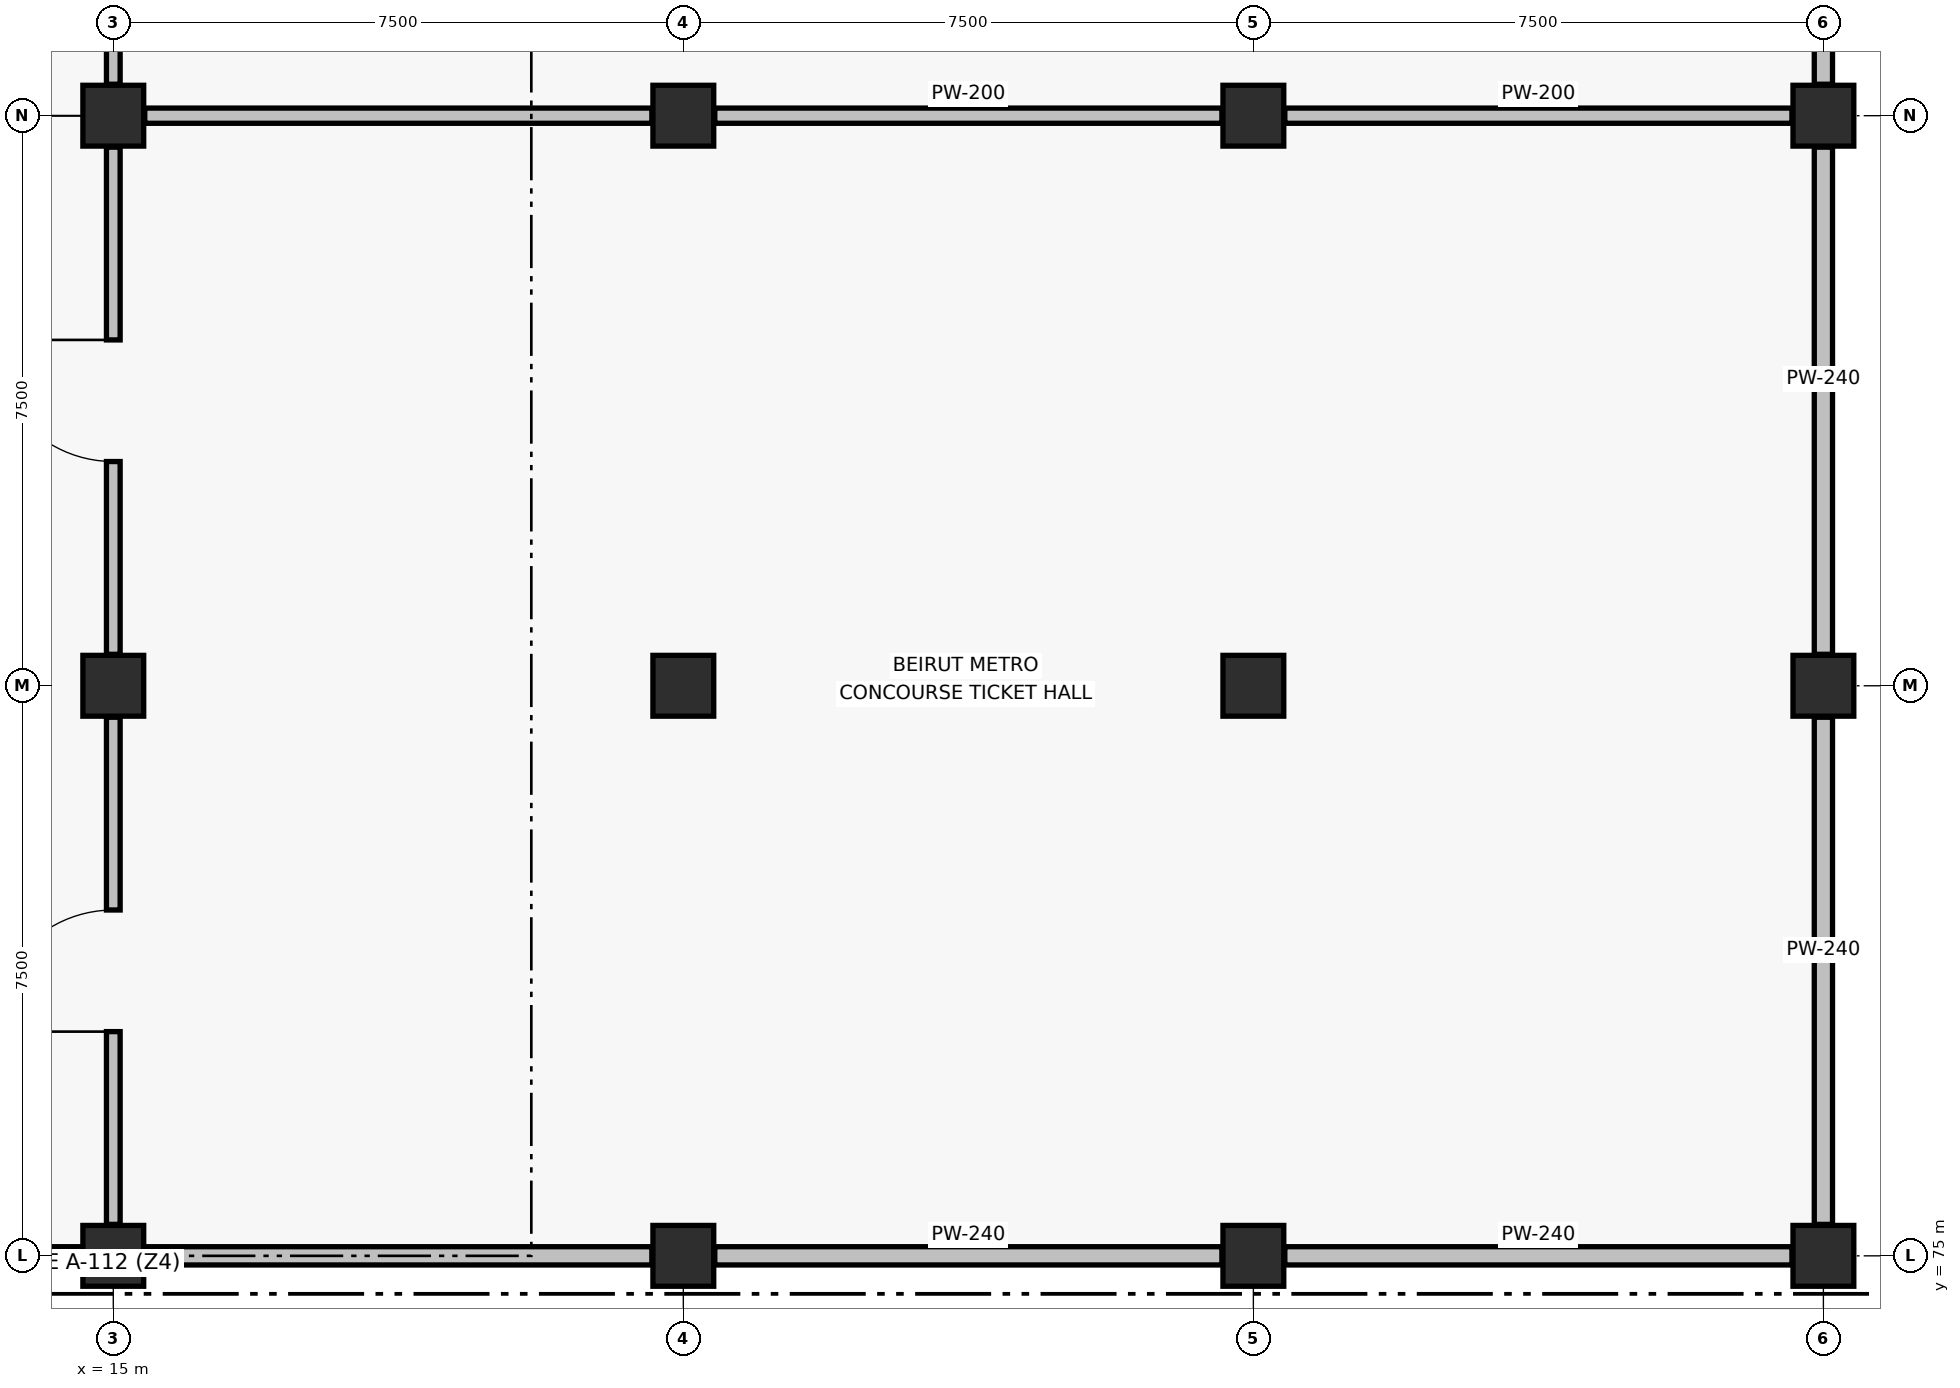
"""IFC4 building model, lengths in metres.
Left out: names, types, materials, properties, quantities, classifications, styles, units other than length and angle.
Written with IfcOpenShell. Run it as: python <this file> out.ifc"""

import sys

from ifc_helpers import new_model, si_unit, direction, frame, frame_2d, origin, origin_2d, place, context, subcontext, project, spatial, rectangle, extrude, element, fill, save


model = new_model("IFC4")
c1 = context("Model", 3, precision=1e-05, world=origin(), true_north=direction((0.0, 1.0)))
c2 = subcontext(c1, "Body", "Model", "MODEL_VIEW")
j1 = project(units=[si_unit("LENGTHUNIT", "METRE"), si_unit("PLANEANGLEUNIT", "RADIAN")], contexts=[c1])
p1 = place(None, origin())
s1 = spatial("IfcSite", under=j1, at=p1, CompositionType="ELEMENT")
p2 = place(p1, origin())
s2 = spatial("IfcBuilding", under=s1, at=p2, CompositionType="ELEMENT")
p3 = place(p2, frame((0.0, 0.0, -4.8)))
s3 = spatial("IfcBuildingStorey", under=s2, at=p3, CompositionType="ELEMENT", Elevation=-4.8)
for number, where, z_axis, x_axis in (
    (1, (15.0, 75.0, 0.0), (0.0, 0.0, 1.0), (1.0, 0.0, 0.0)),
    (2, (15.0, 82.5, 0.0), (0.0, 0.0, 1.0), (1.0, 0.0, 0.0)),
    (3, (15.0, 90.0, 0.0), (0.0, 0.0, 1.0), (1.0, 0.0, 0.0)),
    (4, (22.5, 75.0, 0.0), (0.0, 0.0, 1.0), (1.0, 0.0, 0.0)),
    (5, (22.5, 82.5, 0.0), (0.0, 0.0, 1.0), (1.0, 0.0, 0.0)),
    (6, (22.5, 90.0, 0.0), (0.0, 0.0, 1.0), (1.0, 0.0, 0.0)),
    (7, (30.0, 75.0, 0.0), (0.0, 0.0, 1.0), (1.0, 0.0, 0.0)),
    (8, (30.0, 82.5, 0.0), (0.0, 0.0, 1.0), (1.0, 0.0, 0.0)),
    (9, (30.0, 90.0, 0.0), (0.0, 0.0, 1.0), (1.0, 0.0, 0.0)),
    (10, (37.5, 75.0, 0.0), (0.0, 0.0, 1.0), (1.0, 0.0, 0.0)),
    (11, (37.5, 82.5, 0.0), (0.0, 0.0, 1.0), (1.0, 0.0, 0.0)),
    (12, (37.5, 90.0, 0.0), (0.0, 0.0, 1.0), (1.0, 0.0, 0.0)),
):
    element("IfcColumn", number, at=place(p3, frame(where, z_axis=z_axis, x_axis=x_axis)), inside=s3, PredefinedType="COLUMN", context=c2, shape_type="SweptSolid", body=[
        extrude(rectangle(XDim=0.8, YDim=0.8, at=origin_2d()), origin(), (0.0, 0.0, 1.0), 4.8),
    ])
for number, where, z_axis, x_axis in (
    (13, (7.914, 75.0, 0.0), (0.0, 0.0, 1.0), (1.0, 0.0, 0.0)),
    (14, (15.414, 75.0, 0.0), (0.0, 0.0, 1.0), (1.0, 0.0, 0.0)),
    (15, (22.914, 75.0, 0.0), (0.0, 0.0, 1.0), (1.0, 0.0, 0.0)),
):
    element("IfcWall", number, at=place(p3, frame(where, z_axis=z_axis, x_axis=x_axis)), inside=s3, PredefinedType="PARTITIONING", context=c2, shape_type="SweptSolid", body=[
        extrude(rectangle(XDim=6.672, YDim=0.24, at=frame_2d((3.336, 0.0))), origin(), (0.0, 0.0, 1.0), 3.82),
    ])
p4 = place(p3, frame((30.414, 75.0, 0.0), z_axis=(0.0, 0.0, 1.0), x_axis=(1.0, 0.0, 0.0)))
e16 = element("IfcWall", 16, at=p4, inside=s3, PredefinedType="PARTITIONING", context=c2, shape_type="SweptSolid", body=[
    extrude(rectangle(XDim=6.672, YDim=0.24, at=frame_2d((3.336, 0.0))), origin(), (0.0, 0.0, 1.0), 3.87),
])
for number, where, z_axis, x_axis in (
    (17, (37.5, 75.414, 0.0), (0.0, 0.0, 1.0), (0.0, 1.0, 0.0)),
    (18, (37.5, 82.914, 0.0), (0.0, 0.0, 1.0), (0.0, 1.0, 0.0)),
    (19, (37.5, 90.414, 0.0), (0.0, 0.0, 1.0), (0.0, 1.0, 0.0)),
):
    element("IfcWall", number, at=place(p3, frame(where, z_axis=z_axis, x_axis=x_axis)), inside=s3, PredefinedType="PARTITIONING", context=c2, shape_type="SweptSolid", body=[
        extrude(rectangle(XDim=6.672, YDim=0.24, at=frame_2d((3.336, 0.0))), origin(), (0.0, 0.0, 1.0), 3.42),
    ])
p5 = place(p3, frame((15.414, 90.0, 0.0), z_axis=(0.0, 0.0, 1.0), x_axis=(1.0, 0.0, 0.0)))
e20 = element("IfcWall", 20, at=p5, inside=s3, PredefinedType="PARTITIONING", context=c2, shape_type="SweptSolid", body=[
    extrude(rectangle(XDim=6.672, YDim=0.2, at=frame_2d((3.336, 0.0))), origin(), (0.0, 0.0, 1.0), 3.52),
])
for number, where, z_axis, x_axis in (
    (21, (22.914, 90.0, 0.0), (0.0, 0.0, 1.0), (1.0, 0.0, 0.0)),
    (22, (30.414, 90.0, 0.0), (0.0, 0.0, 1.0), (1.0, 0.0, 0.0)),
):
    element("IfcWall", number, at=place(p3, frame(where, z_axis=z_axis, x_axis=x_axis)), inside=s3, PredefinedType="PARTITIONING", context=c2, shape_type="SweptSolid", body=[
        extrude(rectangle(XDim=6.672, YDim=0.2, at=frame_2d((3.336, 0.0))), origin(), (0.0, 0.0, 1.0), 3.42),
    ])
p6 = place(p3, frame((15.0, 75.414, 0.0), z_axis=(0.0, 0.0, 1.0), x_axis=(0.0, 1.0, 0.0)))
e23 = element("IfcWall", 23, at=p6, inside=s3, PredefinedType="PARTITIONING", context=c2, shape_type="SweptSolid", body=[
    extrude(rectangle(XDim=6.672, YDim=0.18, at=frame_2d((3.336, 0.0))), origin(), (0.0, 0.0, 1.0), 3.52),
])
p7 = place(p6, frame((2.536, 0.0, 0.0)))
e24 = element("IfcOpeningElement", 24, at=p7, cuts=e23, PredefinedType="OPENING", context=c2, shape_type="SweptSolid", body=[
    extrude(rectangle(XDim=1.6, YDim=2.15, at=frame_2d((0.8, 1.075))), frame((0.0, 0.1, 0.0), z_axis=(0.0, -1.0, 0.0), x_axis=(1.0, 0.0, 0.0)), (0.0, 0.0, 1.0), 0.2),
])
p8 = place(p3, frame((15.0, 82.914, 0.0), z_axis=(0.0, 0.0, 1.0), x_axis=(0.0, 1.0, 0.0)))
e25 = element("IfcWall", 25, at=p8, inside=s3, PredefinedType="PARTITIONING", context=c2, shape_type="SweptSolid", body=[
    extrude(rectangle(XDim=6.672, YDim=0.18, at=frame_2d((3.336, 0.0))), origin(), (0.0, 0.0, 1.0), 3.52),
])
p9 = place(p8, frame((2.536, 0.0, 0.0)))
e26 = element("IfcOpeningElement", 26, at=p9, cuts=e25, PredefinedType="OPENING", context=c2, shape_type="SweptSolid", body=[
    extrude(rectangle(XDim=1.6, YDim=2.15, at=frame_2d((0.8, 1.075))), frame((0.0, 0.1, 0.0), z_axis=(0.0, -1.0, 0.0), x_axis=(1.0, 0.0, 0.0)), (0.0, 0.0, 1.0), 0.2),
])
p10 = place(p3, frame((15.0, 90.414, 0.0), z_axis=(0.0, 0.0, 1.0), x_axis=(0.0, 1.0, 0.0)))
e27 = element("IfcWall", 27, at=p10, inside=s3, PredefinedType="PARTITIONING", context=c2, shape_type="SweptSolid", body=[
    extrude(rectangle(XDim=6.672, YDim=0.18, at=frame_2d((3.336, 0.0))), origin(), (0.0, 0.0, 1.0), 3.52),
])
p11 = place(p10, frame((2.736, 0.0, 0.0)))
e28 = element("IfcOpeningElement", 28, at=p11, cuts=e27, PredefinedType="OPENING", context=c2, shape_type="SweptSolid", body=[
    extrude(rectangle(XDim=1.2, YDim=2.15, at=frame_2d((0.6, 1.075))), frame((0.0, 0.1, 0.0), z_axis=(0.0, -1.0, 0.0), x_axis=(1.0, 0.0, 0.0)), (0.0, 0.0, 1.0), 0.2),
])
p12 = place(p7, origin())
e29 = element("IfcDoor", 29, at=p12, inside=s3, OperationType="SINGLE_SWING_LEFT", PredefinedType="DOOR", context=c2, shape_type="SweptSolid", body=[
    extrude(rectangle(XDim=1.6, YDim=2.15, at=frame_2d((0.8, 1.075))), frame((0.0, 0.025, 0.0), z_axis=(0.0, -1.0, 0.0), x_axis=(1.0, 0.0, 0.0)), (0.0, 0.0, 1.0), 0.05),
])
fill(e24, e29)
p13 = place(p9, origin())
e30 = element("IfcDoor", 30, at=p13, inside=s3, OperationType="SINGLE_SWING_RIGHT", PredefinedType="DOOR", context=c2, shape_type="SweptSolid", body=[
    extrude(rectangle(XDim=1.6, YDim=2.15, at=frame_2d((0.8, 1.075))), frame((0.0, 0.025, 0.0), z_axis=(0.0, -1.0, 0.0), x_axis=(1.0, 0.0, 0.0)), (0.0, 0.0, 1.0), 0.05),
])
fill(e26, e30)
save(model, sys.argv[1])
